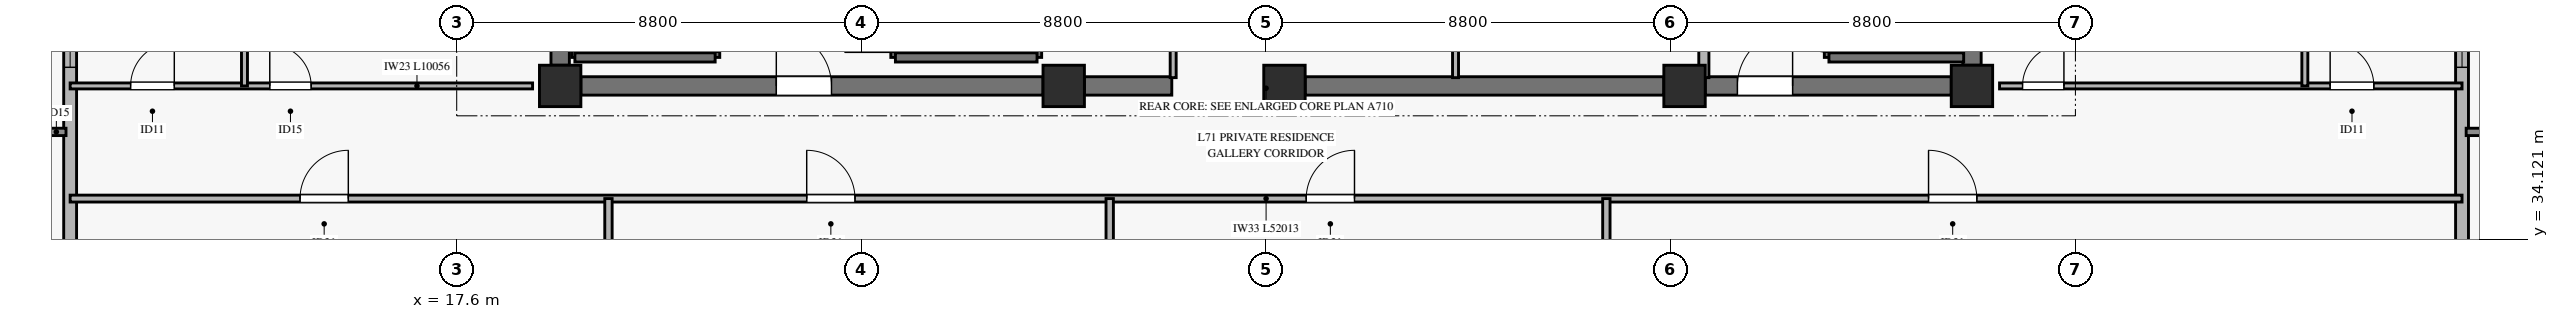
"""IFC4 building model, lengths in metres.
Left out: names, types, materials, properties, quantities, classifications, styles, units other than length and angle.
Written with IfcOpenShell. Run it as: python <this file> out.ifc"""

import sys

from ifc_helpers import new_model, si_unit, direction, frame, frame_2d, origin, origin_2d, place, context, subcontext, project, spatial, rectangle, extrude, source, transform, mapped, element, fill, save


model = new_model("IFC4")
c1 = context("Model", 3, precision=1e-05, world=origin(), true_north=direction((0.0, 1.0)))
c2 = subcontext(c1, "Body", "Model", "MODEL_VIEW")
j1 = project(units=[si_unit("LENGTHUNIT", "METRE"), si_unit("PLANEANGLEUNIT", "RADIAN")], contexts=[c1])
p1 = place(None, origin())
s1 = spatial("IfcSite", under=j1, at=p1, CompositionType="ELEMENT")
p2 = place(p1, origin())
s2 = spatial("IfcBuilding", under=s1, at=p2, CompositionType="ELEMENT")
p3 = place(p2, frame((0.0, 0.0, 275.7)))
s3 = spatial("IfcBuildingStorey", under=s2, at=p3, CompositionType="ELEMENT", Elevation=275.7)
m1 = source(origin(), c2, "Body", "SweptSolid", [
    extrude(rectangle(XDim=0.9, YDim=0.9, at=origin_2d()), origin(), (0.0, 0.0, 1.0), 3.14),
])
for number, where, z_axis, x_axis in (
    (1, (19.85, 37.45, 0.0), (0.0, 0.0, 1.0), (1.0, 0.0, 0.0)),
    (2, (30.8, 37.45, 0.0), (0.0, 0.0, 1.0), (1.0, 0.0, 0.0)),
    (3, (35.6, 37.45, 0.0), (0.0, 0.0, 1.0), (1.0, 0.0, 0.0)),
    (4, (44.3, 37.45, 0.0), (0.0, 0.0, 1.0), (1.0, 0.0, 0.0)),
    (5, (50.55, 37.45, 0.0), (0.0, 0.0, 1.0), (1.0, 0.0, 0.0)),
):
    element("IfcColumn", number, at=place(p3, frame(where, z_axis=z_axis, x_axis=x_axis)), inside=s3, PredefinedType="PILASTER", context=c2, shape_type="MappedRepresentation", body=[
        mapped(m1, transform((0.0, 0.0, 0.0), x_axis=(1.0, 0.0, 0.0), y_axis=(0.0, 1.0, 0.0), z_axis=(0.0, 0.0, 1.0), scale=1.0)),
    ])
p4 = place(p3, frame((20.3, 37.45, 0.0), z_axis=(0.0, 0.0, 1.0), x_axis=(1.0, 0.0, 0.0)))
e6 = element("IfcWall", 6, at=p4, inside=s3, PredefinedType="SHEAR", context=c2, shape_type="SweptSolid", body=[
    extrude(rectangle(XDim=10.05, YDim=0.4, at=frame_2d((5.025, 0.0))), origin(), (0.0, 0.0, 1.0), 3.14),
])
p5 = place(p4, frame((4.25, 0.0, 0.0)))
e7 = element("IfcOpeningElement", 7, at=p5, cuts=e6, PredefinedType="OPENING", context=c2, shape_type="SweptSolid", body=[
    extrude(rectangle(XDim=1.2, YDim=2.15, at=frame_2d((0.6, 1.075))), frame((0.0, 0.21, 0.0), z_axis=(0.0, -1.0, 0.0), x_axis=(1.0, 0.0, 0.0)), (0.0, 0.0, 1.0), 0.42),
])
p6 = place(p3, frame((31.25, 37.45, 0.0), z_axis=(0.0, 0.0, 1.0), x_axis=(1.0, 0.0, 0.0)))
e8 = element("IfcWall", 8, at=p6, inside=s3, PredefinedType="SHEAR", context=c2, shape_type="SweptSolid", body=[
    extrude(rectangle(XDim=1.9, YDim=0.4, at=frame_2d((0.95, 0.0))), origin(), (0.0, 0.0, 1.0), 3.14),
])
p7 = place(p3, frame((36.05, 37.45, 0.0), z_axis=(0.0, 0.0, 1.0), x_axis=(1.0, 0.0, 0.0)))
e9 = element("IfcWall", 9, at=p7, inside=s3, PredefinedType="SHEAR", context=c2, shape_type="SweptSolid", body=[
    extrude(rectangle(XDim=7.8, YDim=0.4, at=frame_2d((3.9, 0.0))), origin(), (0.0, 0.0, 1.0), 3.14),
])
p8 = place(p3, frame((44.75, 37.45, 0.0), z_axis=(0.0, 0.0, 1.0), x_axis=(1.0, 0.0, 0.0)))
e10 = element("IfcWall", 10, at=p8, inside=s3, PredefinedType="SHEAR", context=c2, shape_type="SweptSolid", body=[
    extrude(rectangle(XDim=5.35, YDim=0.4, at=frame_2d((2.675, 0.0))), origin(), (0.0, 0.0, 1.0), 3.14),
])
p9 = place(p8, frame((0.7, 0.0, 0.0)))
e11 = element("IfcOpeningElement", 11, at=p9, cuts=e10, PredefinedType="OPENING", context=c2, shape_type="SweptSolid", body=[
    extrude(rectangle(XDim=1.2, YDim=2.15, at=frame_2d((0.6, 1.075))), frame((0.0, 0.21, 0.0), z_axis=(0.0, -1.0, 0.0), x_axis=(1.0, 0.0, 0.0)), (0.0, 0.0, 1.0), 0.42),
])
for number, where, z_axis, x_axis in (
    (12, (19.85, 37.9, 0.0), (0.0, 0.0, 1.0), (0.0, 1.0, 0.0)),
    (13, (50.55, 37.9, 0.0), (0.0, 0.0, 1.0), (0.0, 1.0, 0.0)),
):
    element("IfcWall", number, at=place(p3, frame(where, z_axis=z_axis, x_axis=x_axis)), inside=s3, PredefinedType="SHEAR", context=c2, shape_type="SweptSolid", body=[
        extrude(rectangle(XDim=8.2, YDim=0.4, at=frame_2d((4.1, 0.0))), origin(), (0.0, 0.0, 1.0), 3.14),
    ])
p10 = place(p3, frame((9.194, 31.763, 0.0), z_axis=(0.0, 0.0, 1.0), x_axis=(0.0, 1.0, 0.0)))
e14 = element("IfcWall", 14, at=p10, inside=s3, PredefinedType="SOLIDWALL", context=c2, shape_type="SweptSolid", body=[
    extrude(rectangle(XDim=11.814, YDim=0.28, at=frame_2d((5.907, 0.0))), origin(), (0.0, 0.0, 1.0), 2.77),
])
p11 = place(p10, frame((6.092, 0.0, 0.45)))
e15 = element("IfcOpeningElement", 15, at=p11, cuts=e14, PredefinedType="OPENING", context=c2, shape_type="SweptSolid", body=[
    extrude(rectangle(XDim=2.2, YDim=2.1, at=frame_2d((1.1, 1.05))), frame((0.0, 0.15, 0.0), z_axis=(0.0, -1.0, 0.0), x_axis=(1.0, 0.0, 0.0)), (0.0, 0.0, 1.0), 0.3),
])
p12 = place(p3, frame((61.207, 31.763, 0.0), z_axis=(0.0, 0.0, 1.0), x_axis=(0.0, 1.0, 0.0)))
e16 = element("IfcWall", 16, at=p12, inside=s3, PredefinedType="SOLIDWALL", context=c2, shape_type="SweptSolid", body=[
    extrude(rectangle(XDim=11.814, YDim=0.28, at=frame_2d((5.907, 0.0))), origin(), (0.0, 0.0, 1.0), 2.77),
])
p13 = place(p12, frame((6.092, 0.0, 0.45)))
e17 = element("IfcOpeningElement", 17, at=p13, cuts=e16, PredefinedType="OPENING", context=c2, shape_type="SweptSolid", body=[
    extrude(rectangle(XDim=2.2, YDim=2.1, at=frame_2d((1.1, 1.05))), frame((0.0, 0.15, 0.0), z_axis=(0.0, -1.0, 0.0), x_axis=(1.0, 0.0, 0.0)), (0.0, 0.0, 1.0), 0.3),
])
p14 = place(p3, frame((20.17, 38.07, 0.0), z_axis=(0.0, 0.0, 1.0), x_axis=(0.0, 1.0, 0.0)))
e18 = element("IfcWall", 18, at=p14, inside=s3, PredefinedType="SOLIDWALL", context=c2, shape_type="SweptSolid", body=[
    extrude(rectangle(XDim=7.25, YDim=0.14, at=frame_2d((3.625, 0.0))), origin(), (0.0, 0.0, 1.0), 3.4),
])
p15 = place(p3, frame((23.22, 38.07, 0.0), z_axis=(0.0, 0.0, 1.0), x_axis=(0.0, 1.0, 0.0)))
e19 = element("IfcWall", 19, at=p15, inside=s3, PredefinedType="SOLIDWALL", context=c2, shape_type="SweptSolid", body=[
    extrude(rectangle(XDim=7.25, YDim=0.2, at=frame_2d((3.625, 0.0))), origin(), (0.0, 0.0, 1.0), 3.4),
])
p16 = place(p15, frame((0.11, 0.0, 0.0)))
e20 = element("IfcOpeningElement", 20, at=p16, cuts=e19, PredefinedType="OPENING", context=c2, shape_type="SweptSolid", body=[
    extrude(rectangle(XDim=1.1, YDim=2.15, at=frame_2d((0.55, 1.075))), frame((0.0, 0.11, 0.0), z_axis=(0.0, -1.0, 0.0), x_axis=(1.0, 0.0, 0.0)), (0.0, 0.0, 1.0), 0.22),
])
p17 = place(p3, frame((20.17, 38.07, 0.0), z_axis=(0.0, 0.0, 1.0), x_axis=(1.0, 0.0, 0.0)))
e21 = element("IfcWall", 21, at=p17, inside=s3, PredefinedType="SOLIDWALL", context=c2, shape_type="SweptSolid", body=[
    extrude(rectangle(XDim=3.05, YDim=0.2, at=frame_2d((1.525, 0.0))), origin(), (0.0, 0.0, 1.0), 3.4),
])
p18 = place(p3, frame((27.14, 38.07, 0.0), z_axis=(0.0, 0.0, 1.0), x_axis=(0.0, 1.0, 0.0)))
e22 = element("IfcWall", 22, at=p18, inside=s3, PredefinedType="SOLIDWALL", context=c2, shape_type="SweptSolid", body=[
    extrude(rectangle(XDim=7.25, YDim=0.2, at=frame_2d((3.625, 0.0))), origin(), (0.0, 0.0, 1.0), 3.4),
])
p19 = place(p18, frame((0.11, 0.0, 0.0)))
e23 = element("IfcOpeningElement", 23, at=p19, cuts=e22, PredefinedType="OPENING", context=c2, shape_type="SweptSolid", body=[
    extrude(rectangle(XDim=1.1, YDim=2.15, at=frame_2d((0.55, 1.075))), frame((0.0, 0.11, 0.0), z_axis=(0.0, -1.0, 0.0), x_axis=(1.0, 0.0, 0.0)), (0.0, 0.0, 1.0), 0.22),
])
p20 = place(p3, frame((30.22, 38.07, 0.0), z_axis=(0.0, 0.0, 1.0), x_axis=(0.0, 1.0, 0.0)))
e24 = element("IfcWall", 24, at=p20, inside=s3, PredefinedType="SOLIDWALL", context=c2, shape_type="SweptSolid", body=[
    extrude(rectangle(XDim=7.25, YDim=0.2, at=frame_2d((3.625, 0.0))), origin(), (0.0, 0.0, 1.0), 3.4),
])
p21 = place(p3, frame((27.14, 38.07, 0.0), z_axis=(0.0, 0.0, 1.0), x_axis=(1.0, 0.0, 0.0)))
e25 = element("IfcWall", 25, at=p21, inside=s3, PredefinedType="SOLIDWALL", context=c2, shape_type="SweptSolid", body=[
    extrude(rectangle(XDim=3.08, YDim=0.2, at=frame_2d((1.54, 0.0))), origin(), (0.0, 0.0, 1.0), 3.4),
])
p22 = place(p3, frame((47.44, 38.07, 0.0), z_axis=(0.0, 0.0, 1.0), x_axis=(0.0, 1.0, 0.0)))
e26 = element("IfcWall", 26, at=p22, inside=s3, PredefinedType="SOLIDWALL", context=c2, shape_type="SweptSolid", body=[
    extrude(rectangle(XDim=7.25, YDim=0.2, at=frame_2d((3.625, 0.0))), origin(), (0.0, 0.0, 1.0), 3.4),
])
p23 = place(p22, frame((0.11, 0.0, 0.0)))
e27 = element("IfcOpeningElement", 27, at=p23, cuts=e26, PredefinedType="OPENING", context=c2, shape_type="SweptSolid", body=[
    extrude(rectangle(XDim=1.1, YDim=2.15, at=frame_2d((0.55, 1.075))), frame((0.0, 0.11, 0.0), z_axis=(0.0, -1.0, 0.0), x_axis=(1.0, 0.0, 0.0)), (0.0, 0.0, 1.0), 0.22),
])
p24 = place(p3, frame((47.44, 38.07, 0.0), z_axis=(0.0, 0.0, 1.0), x_axis=(1.0, 0.0, 0.0)))
e28 = element("IfcWall", 28, at=p24, inside=s3, PredefinedType="SOLIDWALL", context=c2, shape_type="SweptSolid", body=[
    extrude(rectangle(XDim=2.93, YDim=0.2, at=frame_2d((1.465, 0.0))), origin(), (0.0, 0.0, 1.0), 3.4),
])
p25 = place(p3, frame((44.72, 37.63, 0.0), z_axis=(0.0, 0.0, 1.0), x_axis=(0.0, 1.0, 0.0)))
e29 = element("IfcWall", 29, at=p25, inside=s3, PredefinedType="SOLIDWALL", context=c2, shape_type="SweptSolid", body=[
    extrude(rectangle(XDim=7.59, YDim=0.22, at=frame_2d((3.795, 0.0))), origin(), (0.0, 0.0, 1.0), 3.14),
])
p26 = place(p3, frame((33.18, 37.63, 0.0), z_axis=(0.0, 0.0, 1.0), x_axis=(0.0, 1.0, 0.0)))
e30 = element("IfcWall", 30, at=p26, inside=s3, PredefinedType="PARTITIONING", context=c2, shape_type="SweptSolid", body=[
    extrude(rectangle(XDim=6.52, YDim=0.13, at=frame_2d((3.26, 0.0))), origin(), (0.0, 0.0, 1.0), 2.225),
])
p27 = place(p26, frame((1.32, 0.0, 0.0)))
e31 = element("IfcOpeningElement", 31, at=p27, cuts=e30, PredefinedType="OPENING", context=c2, shape_type="SweptSolid", body=[
    extrude(rectangle(XDim=0.9, YDim=2.1, at=frame_2d((0.45, 1.05))), frame((0.0, 0.075, 0.0), z_axis=(0.0, -1.0, 0.0), x_axis=(1.0, 0.0, 0.0)), (0.0, 0.0, 1.0), 0.15),
])
p28 = place(p26, frame((4.62, 0.0, 0.0)))
e32 = element("IfcOpeningElement", 32, at=p28, cuts=e30, PredefinedType="OPENING", context=c2, shape_type="SweptSolid", body=[
    extrude(rectangle(XDim=0.9, YDim=2.1, at=frame_2d((0.45, 1.05))), frame((0.0, 0.075, 0.0), z_axis=(0.0, -1.0, 0.0), x_axis=(1.0, 0.0, 0.0)), (0.0, 0.0, 1.0), 0.15),
])
p29 = place(p3, frame((39.32, 37.63, 0.0), z_axis=(0.0, 0.0, 1.0), x_axis=(0.0, 1.0, 0.0)))
e33 = element("IfcWall", 33, at=p29, inside=s3, PredefinedType="PARTITIONING", context=c2, shape_type="SweptSolid", body=[
    extrude(rectangle(XDim=8.74, YDim=0.13, at=frame_2d((4.37, 0.0))), origin(), (0.0, 0.0, 1.0), 3.14),
])
p30 = place(p29, frame((4.89, 0.0, 0.0)))
e34 = element("IfcOpeningElement", 34, at=p30, cuts=e33, PredefinedType="OPENING", context=c2, shape_type="SweptSolid", body=[
    extrude(rectangle(XDim=0.9, YDim=2.1, at=frame_2d((0.45, 1.05))), frame((0.0, 0.075, 0.0), z_axis=(0.0, -1.0, 0.0), x_axis=(1.0, 0.0, 0.0)), (0.0, 0.0, 1.0), 0.15),
])
p31 = place(p3, frame((9.194, 35.0, 0.0), z_axis=(0.0, 0.0, 1.0), x_axis=(1.0, 0.0, 0.0)))
e35 = element("IfcWall", 35, at=p31, inside=s3, PredefinedType="PARTITIONING", context=c2, shape_type="SweptSolid", body=[
    extrude(rectangle(XDim=52.013, YDim=0.15, at=frame_2d((26.006, 0.0))), origin(), (0.0, 0.0, 1.0), 2.425),
])
p32 = place(p31, frame((4.999, 0.0, 0.0)))
e36 = element("IfcOpeningElement", 36, at=p32, cuts=e35, PredefinedType="OPENING", context=c2, shape_type="SweptSolid", body=[
    extrude(rectangle(XDim=1.05, YDim=2.15, at=frame_2d((0.525, 1.075))), frame((0.0, 0.085, 0.0), z_axis=(0.0, -1.0, 0.0), x_axis=(1.0, 0.0, 0.0)), (0.0, 0.0, 1.0), 0.17),
])
p33 = place(p31, frame((16.017, 0.0, 0.0)))
e37 = element("IfcOpeningElement", 37, at=p33, cuts=e35, PredefinedType="OPENING", context=c2, shape_type="SweptSolid", body=[
    extrude(rectangle(XDim=1.05, YDim=2.15, at=frame_2d((0.525, 1.075))), frame((0.0, 0.085, 0.0), z_axis=(0.0, -1.0, 0.0), x_axis=(1.0, 0.0, 0.0)), (0.0, 0.0, 1.0), 0.17),
])
p34 = place(p31, frame((26.879, 0.0, 0.0)))
e38 = element("IfcOpeningElement", 38, at=p34, cuts=e35, PredefinedType="OPENING", context=c2, shape_type="SweptSolid", body=[
    extrude(rectangle(XDim=1.05, YDim=2.15, at=frame_2d((0.525, 1.075))), frame((0.0, 0.085, 0.0), z_axis=(0.0, -1.0, 0.0), x_axis=(1.0, 0.0, 0.0)), (0.0, 0.0, 1.0), 0.17),
])
p35 = place(p31, frame((40.412, 0.0, 0.0)))
e39 = element("IfcOpeningElement", 39, at=p35, cuts=e35, PredefinedType="OPENING", context=c2, shape_type="SweptSolid", body=[
    extrude(rectangle(XDim=1.05, YDim=2.15, at=frame_2d((0.525, 1.075))), frame((0.0, 0.085, 0.0), z_axis=(0.0, -1.0, 0.0), x_axis=(1.0, 0.0, 0.0)), (0.0, 0.0, 1.0), 0.17),
])
for number, where, z_axis, x_axis in (
    (40, (20.9, 16.976, 0.0), (0.0, 0.0, 1.0), (0.0, 1.0, 0.0)),
    (41, (31.8, 16.976, 0.0), (0.0, 0.0, 1.0), (0.0, 1.0, 0.0)),
    (42, (42.6, 16.976, 0.0), (0.0, 0.0, 1.0), (0.0, 1.0, 0.0)),
):
    element("IfcWall", number, at=place(p3, frame(where, z_axis=z_axis, x_axis=x_axis)), inside=s3, PredefinedType="PARTITIONING", context=c2, shape_type="SweptSolid", body=[
        extrude(rectangle(XDim=18.024, YDim=0.16, at=frame_2d((9.012, 0.0))), origin(), (0.0, 0.0, 1.0), 2.725),
    ])
p36 = place(p3, frame((9.194, 37.45, 0.0), z_axis=(0.0, 0.0, 1.0), x_axis=(1.0, 0.0, 0.0)))
e43 = element("IfcWall", 43, at=p36, inside=s3, PredefinedType="PARTITIONING", context=c2, shape_type="SweptSolid", body=[
    extrude(rectangle(XDim=10.056, YDim=0.13, at=frame_2d((5.028, 0.0))), origin(), (0.0, 0.0, 1.0), 2.775),
])
p37 = place(p36, frame((1.315, 0.0, 0.0)))
e44 = element("IfcOpeningElement", 44, at=p37, cuts=e43, PredefinedType="OPENING", context=c2, shape_type="SweptSolid", body=[
    extrude(rectangle(XDim=0.95, YDim=2.1, at=frame_2d((0.475, 1.05))), frame((0.0, 0.075, 0.0), z_axis=(0.0, -1.0, 0.0), x_axis=(1.0, 0.0, 0.0)), (0.0, 0.0, 1.0), 0.15),
])
p38 = place(p36, frame((4.341, 0.0, 0.0)))
e45 = element("IfcOpeningElement", 45, at=p38, cuts=e43, PredefinedType="OPENING", context=c2, shape_type="SweptSolid", body=[
    extrude(rectangle(XDim=0.9, YDim=2.1, at=frame_2d((0.45, 1.05))), frame((0.0, 0.075, 0.0), z_axis=(0.0, -1.0, 0.0), x_axis=(1.0, 0.0, 0.0)), (0.0, 0.0, 1.0), 0.15),
])
p39 = place(p3, frame((12.985, 37.45, 0.0), z_axis=(0.0, 0.0, 1.0), x_axis=(0.0, 1.0, 0.0)))
e46 = element("IfcWall", 46, at=p39, inside=s3, PredefinedType="PARTITIONING", context=c2, shape_type="SweptSolid", body=[
    extrude(rectangle(XDim=8.8, YDim=0.13, at=frame_2d((4.4, 0.0))), origin(), (0.0, 0.0, 1.0), 3.14),
])
p40 = place(p3, frame((51.15, 37.45, 0.0), z_axis=(0.0, 0.0, 1.0), x_axis=(1.0, 0.0, 0.0)))
e47 = element("IfcWall", 47, at=p40, inside=s3, PredefinedType="PARTITIONING", context=c2, shape_type="SweptSolid", body=[
    extrude(rectangle(XDim=10.057, YDim=0.13, at=frame_2d((5.029, 0.0))), origin(), (0.0, 0.0, 1.0), 2.775),
])
p41 = place(p40, frame((0.5, 0.0, 0.0)))
e48 = element("IfcOpeningElement", 48, at=p41, cuts=e47, PredefinedType="OPENING", context=c2, shape_type="SweptSolid", body=[
    extrude(rectangle(XDim=0.9, YDim=2.1, at=frame_2d((0.45, 1.05))), frame((0.0, 0.075, 0.0), z_axis=(0.0, -1.0, 0.0), x_axis=(1.0, 0.0, 0.0)), (0.0, 0.0, 1.0), 0.15),
])
p42 = place(p40, frame((7.189, 0.0, 0.0)))
e49 = element("IfcOpeningElement", 49, at=p42, cuts=e47, PredefinedType="OPENING", context=c2, shape_type="SweptSolid", body=[
    extrude(rectangle(XDim=0.95, YDim=2.1, at=frame_2d((0.475, 1.05))), frame((0.0, 0.075, 0.0), z_axis=(0.0, -1.0, 0.0), x_axis=(1.0, 0.0, 0.0)), (0.0, 0.0, 1.0), 0.15),
])
p43 = place(p3, frame((57.789, 37.45, 0.0), z_axis=(0.0, 0.0, 1.0), x_axis=(0.0, 1.0, 0.0)))
e50 = element("IfcWall", 50, at=p43, inside=s3, PredefinedType="PARTITIONING", context=c2, shape_type="SweptSolid", body=[
    extrude(rectangle(XDim=8.8, YDim=0.13, at=frame_2d((4.4, 0.0))), origin(), (0.0, 0.0, 1.0), 3.14),
])
m2 = source(origin(), c2, "Body", "SweptSolid", [
    extrude(rectangle(XDim=2.2, YDim=2.1, at=frame_2d((1.1, 1.05))), frame((0.0, 0.03, 0.0), z_axis=(0.0, -1.0, 0.0), x_axis=(1.0, 0.0, 0.0)), (0.0, 0.0, 1.0), 0.06),
])
p44 = place(p11, origin())
e51 = element("IfcWindow", 51, at=p44, inside=s3, PartitioningType="SINGLE_PANEL", PredefinedType="WINDOW", context=c2, shape_type="MappedRepresentation", body=[
    mapped(m2, transform((0.0, 0.0, 0.0), x_axis=(1.0, 0.0, 0.0), y_axis=(0.0, 1.0, 0.0), z_axis=(0.0, 0.0, 1.0), scale=1.0)),
])
fill(e15, e51)
p45 = place(p13, origin())
e52 = element("IfcWindow", 52, at=p45, inside=s3, PartitioningType="SINGLE_PANEL", PredefinedType="WINDOW", context=c2, shape_type="MappedRepresentation", body=[
    mapped(m2, transform((0.0, 0.0, 0.0), x_axis=(1.0, 0.0, 0.0), y_axis=(0.0, 1.0, 0.0), z_axis=(0.0, 0.0, 1.0), scale=1.0)),
])
fill(e17, e52)
m3 = source(origin(), c2, "Body", "SweptSolid", [
    extrude(rectangle(XDim=1.2, YDim=2.15, at=frame_2d((0.6, 1.075))), frame((0.0, 0.025, 0.0), z_axis=(0.0, -1.0, 0.0), x_axis=(1.0, 0.0, 0.0)), (0.0, 0.0, 1.0), 0.05),
])
p46 = place(p5, origin())
e53 = element("IfcDoor", 53, at=p46, inside=s3, OperationType="SINGLE_SWING_LEFT", PredefinedType="DOOR", context=c2, shape_type="MappedRepresentation", body=[
    mapped(m3, transform((0.0, 0.0, 0.0), x_axis=(1.0, 0.0, 0.0), y_axis=(0.0, 1.0, 0.0), z_axis=(0.0, 0.0, 1.0), scale=1.0)),
])
fill(e7, e53)
p47 = place(p9, origin())
e54 = element("IfcDoor", 54, at=p47, inside=s3, OperationType="SINGLE_SWING_RIGHT", PredefinedType="DOOR", context=c2, shape_type="MappedRepresentation", body=[
    mapped(m3, transform((0.0, 0.0, 0.0), x_axis=(1.0, 0.0, 0.0), y_axis=(0.0, 1.0, 0.0), z_axis=(0.0, 0.0, 1.0), scale=1.0)),
])
fill(e11, e54)
m4 = source(origin(), c2, "Body", "SweptSolid", [
    extrude(rectangle(XDim=1.05, YDim=2.15, at=frame_2d((0.525, 1.075))), frame((0.0, 0.025, 0.0), z_axis=(0.0, -1.0, 0.0), x_axis=(1.0, 0.0, 0.0)), (0.0, 0.0, 1.0), 0.05),
])
p48 = place(p32, origin())
e55 = element("IfcDoor", 55, at=p48, inside=s3, OperationType="SINGLE_SWING_RIGHT", PredefinedType="DOOR", context=c2, shape_type="MappedRepresentation", body=[
    mapped(m4, transform((0.0, 0.0, 0.0), x_axis=(1.0, 0.0, 0.0), y_axis=(0.0, 1.0, 0.0), z_axis=(0.0, 0.0, 1.0), scale=1.0)),
])
fill(e36, e55)
p49 = place(p33, origin())
e56 = element("IfcDoor", 56, at=p49, inside=s3, OperationType="SINGLE_SWING_LEFT", PredefinedType="DOOR", context=c2, shape_type="MappedRepresentation", body=[
    mapped(m4, transform((0.0, 0.0, 0.0), x_axis=(1.0, 0.0, 0.0), y_axis=(0.0, 1.0, 0.0), z_axis=(0.0, 0.0, 1.0), scale=1.0)),
])
fill(e37, e56)
p50 = place(p34, origin())
e57 = element("IfcDoor", 57, at=p50, inside=s3, OperationType="SINGLE_SWING_RIGHT", PredefinedType="DOOR", context=c2, shape_type="MappedRepresentation", body=[
    mapped(m4, transform((0.0, 0.0, 0.0), x_axis=(1.0, 0.0, 0.0), y_axis=(0.0, 1.0, 0.0), z_axis=(0.0, 0.0, 1.0), scale=1.0)),
])
fill(e38, e57)
p51 = place(p35, origin())
e58 = element("IfcDoor", 58, at=p51, inside=s3, OperationType="SINGLE_SWING_LEFT", PredefinedType="DOOR", context=c2, shape_type="MappedRepresentation", body=[
    mapped(m4, transform((0.0, 0.0, 0.0), x_axis=(1.0, 0.0, 0.0), y_axis=(0.0, 1.0, 0.0), z_axis=(0.0, 0.0, 1.0), scale=1.0)),
])
fill(e39, e58)
m5 = source(origin(), c2, "Body", "SweptSolid", [
    extrude(rectangle(XDim=0.95, YDim=2.1, at=frame_2d((0.475, 1.05))), frame((0.0, 0.025, 0.0), z_axis=(0.0, -1.0, 0.0), x_axis=(1.0, 0.0, 0.0)), (0.0, 0.0, 1.0), 0.05),
])
p52 = place(p37, origin())
e59 = element("IfcDoor", 59, at=p52, inside=s3, OperationType="SINGLE_SWING_RIGHT", PredefinedType="DOOR", context=c2, shape_type="MappedRepresentation", body=[
    mapped(m5, transform((0.0, 0.0, 0.0), x_axis=(1.0, 0.0, 0.0), y_axis=(0.0, 1.0, 0.0), z_axis=(0.0, 0.0, 1.0), scale=1.0)),
])
fill(e44, e59)
m6 = source(origin(), c2, "Body", "SweptSolid", [
    extrude(rectangle(XDim=0.9, YDim=2.1, at=frame_2d((0.45, 1.05))), frame((0.0, 0.025, 0.0), z_axis=(0.0, -1.0, 0.0), x_axis=(1.0, 0.0, 0.0)), (0.0, 0.0, 1.0), 0.05),
])
p53 = place(p38, origin())
e60 = element("IfcDoor", 60, at=p53, inside=s3, OperationType="SINGLE_SWING_LEFT", PredefinedType="DOOR", context=c2, shape_type="MappedRepresentation", body=[
    mapped(m6, transform((0.0, 0.0, 0.0), x_axis=(1.0, 0.0, 0.0), y_axis=(0.0, 1.0, 0.0), z_axis=(0.0, 0.0, 1.0), scale=1.0)),
])
fill(e45, e60)
p54 = place(p41, origin())
e61 = element("IfcDoor", 61, at=p54, inside=s3, OperationType="SINGLE_SWING_RIGHT", PredefinedType="DOOR", context=c2, shape_type="MappedRepresentation", body=[
    mapped(m6, transform((0.0, 0.0, 0.0), x_axis=(1.0, 0.0, 0.0), y_axis=(0.0, 1.0, 0.0), z_axis=(0.0, 0.0, 1.0), scale=1.0)),
])
fill(e48, e61)
p55 = place(p42, origin())
e62 = element("IfcDoor", 62, at=p55, inside=s3, OperationType="SINGLE_SWING_LEFT", PredefinedType="DOOR", context=c2, shape_type="MappedRepresentation", body=[
    mapped(m5, transform((0.0, 0.0, 0.0), x_axis=(1.0, 0.0, 0.0), y_axis=(0.0, 1.0, 0.0), z_axis=(0.0, 0.0, 1.0), scale=1.0)),
])
fill(e49, e62)
save(model, sys.argv[1])
